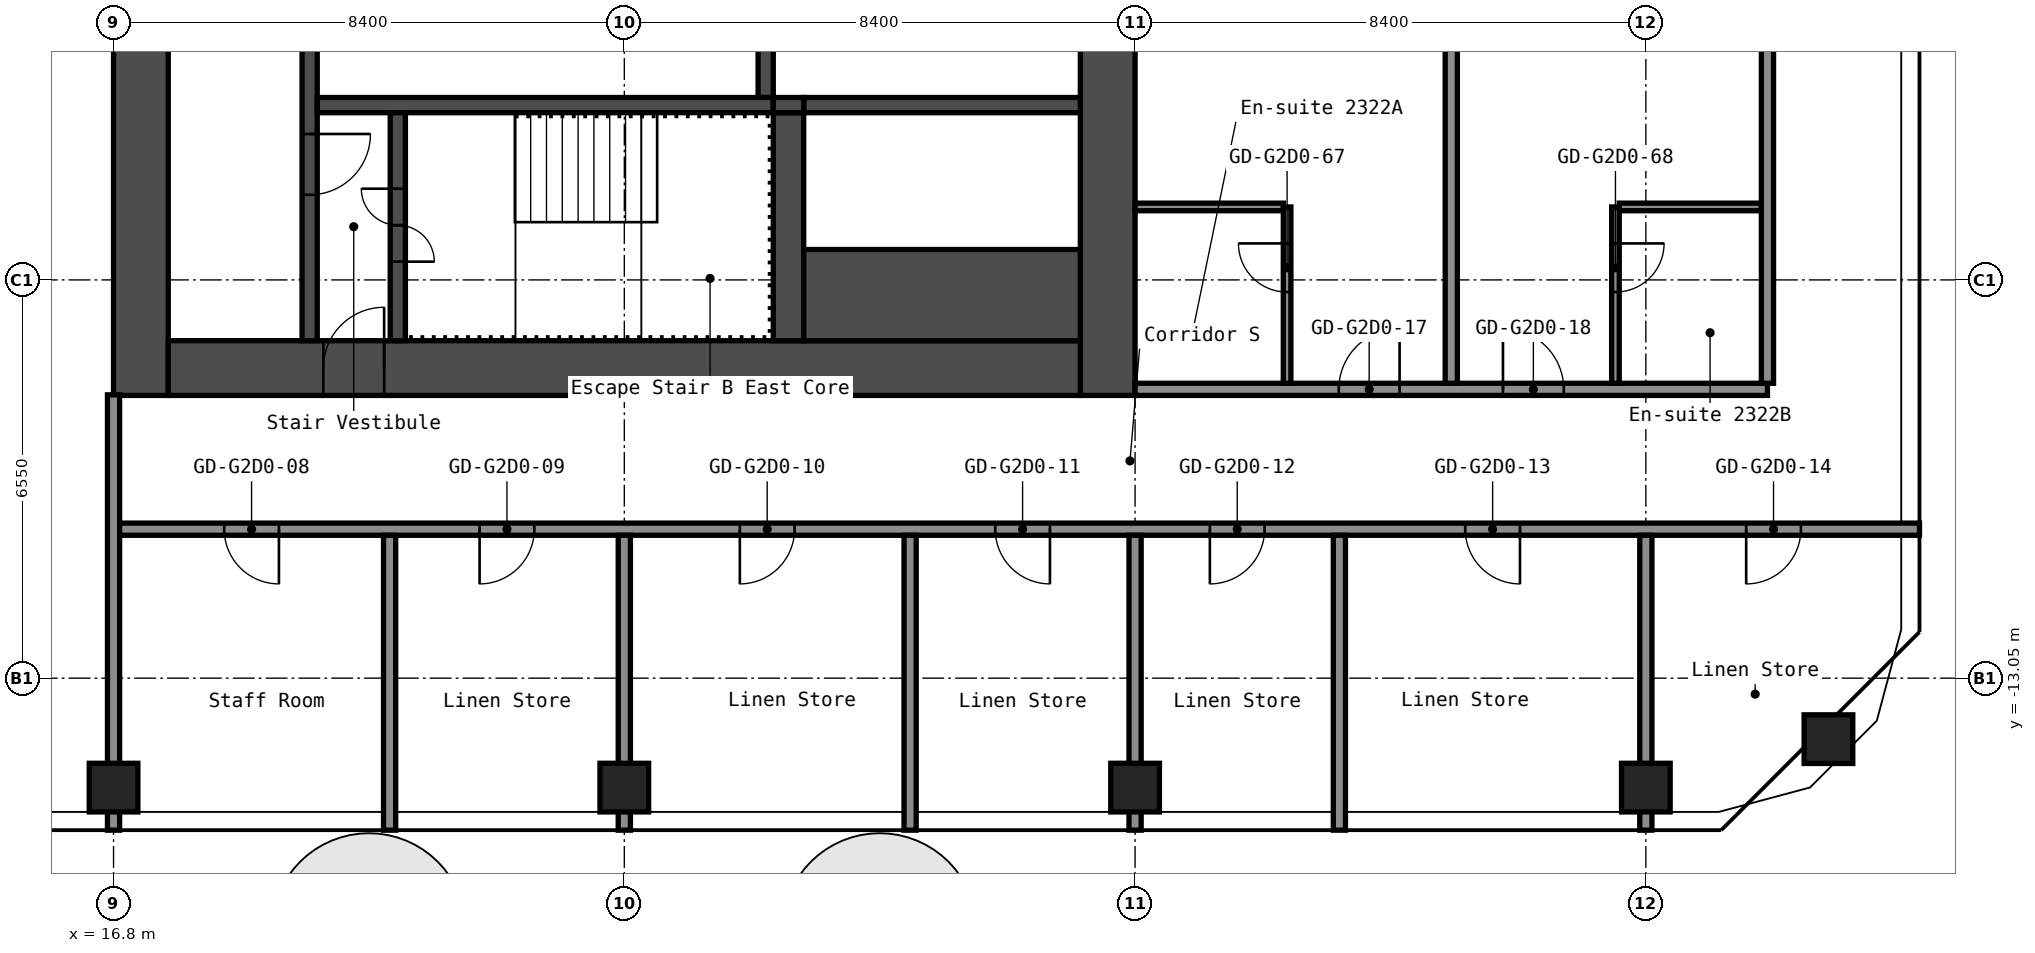
"""IFC4 building model, lengths in metres.
Left out: names, types, materials, properties, quantities, classifications, styles, units other than length and angle.
Written with IfcOpenShell. Run it as: python <this file> out.ifc"""

import sys

from ifc_helpers import new_model, si_unit, direction, frame, frame_2d, origin, origin_2d, place, context, subcontext, project, spatial, rectangle, hollow_rectangle, extrude, element, fill, save


model = new_model("IFC4")
c1 = context("Model", 3, precision=1e-05, world=origin(), true_north=direction((0.0, 1.0)))
c2 = subcontext(c1, "Body", "Model", "MODEL_VIEW")
j1 = project(units=[si_unit("LENGTHUNIT", "METRE"), si_unit("PLANEANGLEUNIT", "RADIAN")], contexts=[c1])
p1 = place(None, origin())
s1 = spatial("IfcSite", under=j1, at=p1, CompositionType="ELEMENT")
p2 = place(p1, origin())
s2 = spatial("IfcBuilding", under=s1, at=p2, CompositionType="ELEMENT")
p3 = place(p2, frame((0.0, 0.0, 85.0)))
s3 = spatial("IfcBuildingStorey", under=s2, at=p3, CompositionType="ELEMENT", Elevation=85.0)
for number, where, z_axis, x_axis in (
    (1, (16.8, -14.85, 0.0), (0.0, 0.0, 1.0), (1.0, 0.0, 0.0)),
    (2, (25.2, -14.85, 0.0), (0.0, 0.0, 1.0), (1.0, 0.0, 0.0)),
    (3, (33.6, -14.85, 0.0), (0.0, 0.0, 1.0), (1.0, 0.0, 0.0)),
    (4, (42.0, -14.85, 0.0), (0.0, 0.0, 1.0), (1.0, 0.0, 0.0)),
    (5, (45.003, -14.053, 0.0), (0.0, 0.0, 1.0), (1.0, 0.0, 0.0)),
):
    element("IfcColumn", number, at=place(p3, frame(where, z_axis=z_axis, x_axis=x_axis)), inside=s3, PredefinedType="COLUMN", context=c2, shape_type="SweptSolid", body=[
        extrude(hollow_rectangle(XDim=0.8, YDim=0.8, WallThickness=0.032, at=origin_2d()), origin(), (0.0, 0.0, 1.0), 2.8),
    ])
p4 = place(p3, frame((17.25, -8.4, 0.0), z_axis=(0.0, 0.0, 1.0), x_axis=(0.0, 1.0, 0.0)))
e6 = element("IfcWall", 6, at=p4, inside=s3, PredefinedType="SHEAR", context=c2, shape_type="SweptSolid", body=[
    extrude(rectangle(XDim=16.8, YDim=0.9, at=frame_2d((8.4, 0.0))), origin(), (0.0, 0.0, 1.0), 2.8),
])
p5 = place(p4, frame((7.6, 0.0, 0.0)))
e7 = element("IfcOpeningElement", 7, at=p5, cuts=e6, PredefinedType="OPENING", context=c2, shape_type="SweptSolid", body=[
    extrude(rectangle(XDim=1.2, YDim=2.1, at=frame_2d((0.6, 1.05))), frame((0.0, 0.46, 0.0), z_axis=(0.0, -1.0, 0.0), x_axis=(1.0, 0.0, 0.0)), (0.0, 0.0, 1.0), 0.92),
])
p6 = place(p3, frame((33.15, -8.4, 0.0), z_axis=(0.0, 0.0, 1.0), x_axis=(0.0, 1.0, 0.0)))
e8 = element("IfcWall", 8, at=p6, inside=s3, PredefinedType="SHEAR", context=c2, shape_type="SweptSolid", body=[
    extrude(rectangle(XDim=16.8, YDim=0.9, at=frame_2d((8.4, 0.0))), origin(), (0.0, 0.0, 1.0), 2.8),
])
p7 = place(p3, frame((17.7, -7.95, 0.0), z_axis=(0.0, 0.0, 1.0), x_axis=(1.0, 0.0, 0.0)))
e9 = element("IfcWall", 9, at=p7, inside=s3, PredefinedType="SHEAR", context=c2, shape_type="SweptSolid", body=[
    extrude(rectangle(XDim=15.0, YDim=0.9, at=frame_2d((7.5, 0.0))), origin(), (0.0, 0.0, 1.0), 2.8),
])
p8 = place(p7, frame((2.55, 0.0, 0.0)))
e10 = element("IfcOpeningElement", 10, at=p8, cuts=e9, PredefinedType="OPENING", context=c2, shape_type="SweptSolid", body=[
    extrude(rectangle(XDim=1.0, YDim=2.1, at=frame_2d((0.5, 1.05))), frame((0.0, 0.46, 0.0), z_axis=(0.0, -1.0, 0.0), x_axis=(1.0, 0.0, 0.0)), (0.0, 0.0, 1.0), 0.92),
])
p9 = place(p3, frame((20.025, -7.5, 0.0), z_axis=(0.0, 0.0, 1.0), x_axis=(0.0, 1.0, 0.0)))
e11 = element("IfcWall", 11, at=p9, inside=s3, PredefinedType="SHEAR", context=c2, shape_type="SweptSolid", body=[
    extrude(rectangle(XDim=6.3, YDim=0.25, at=frame_2d((3.15, 0.0))), origin(), (0.0, 0.0, 1.0), 2.8),
])
p10 = place(p9, frame((2.4, 0.0, 0.0)))
e12 = element("IfcOpeningElement", 12, at=p10, cuts=e11, PredefinedType="OPENING", context=c2, shape_type="SweptSolid", body=[
    extrude(rectangle(XDim=1.0, YDim=2.1, at=frame_2d((0.5, 1.05))), frame((0.0, 0.135, 0.0), z_axis=(0.0, -1.0, 0.0), x_axis=(1.0, 0.0, 0.0)), (0.0, 0.0, 1.0), 0.27),
])
p11 = place(p3, frame((27.525, -3.5, 0.0), z_axis=(0.0, 0.0, 1.0), x_axis=(0.0, 1.0, 0.0)))
e13 = element("IfcWall", 13, at=p11, inside=s3, PredefinedType="SHEAR", context=c2, shape_type="SweptSolid", body=[
    extrude(rectangle(XDim=2.05, YDim=0.25, at=frame_2d((1.025, 0.0))), origin(), (0.0, 0.0, 1.0), 2.8),
])
p12 = place(p3, frame((20.15, -3.625, 0.0), z_axis=(0.0, 0.0, 1.0), x_axis=(1.0, 0.0, 0.0)))
e14 = element("IfcWall", 14, at=p12, inside=s3, PredefinedType="SHEAR", context=c2, shape_type="SweptSolid", body=[
    extrude(rectangle(XDim=7.5, YDim=0.25, at=frame_2d((3.75, 0.0))), origin(), (0.0, 0.0, 1.0), 2.8),
])
p13 = place(p3, frame((21.475, -7.5, 0.0), z_axis=(0.0, 0.0, 1.0), x_axis=(0.0, 1.0, 0.0)))
e15 = element("IfcWall", 15, at=p13, inside=s3, PredefinedType="SHEAR", context=c2, shape_type="SweptSolid", body=[
    extrude(rectangle(XDim=3.75, YDim=0.25, at=frame_2d((1.875, 0.0))), origin(), (0.0, 0.0, 1.0), 2.8),
])
p14 = place(p13, frame((1.3, 0.0, 0.0)))
e16 = element("IfcOpeningElement", 16, at=p14, cuts=e15, PredefinedType="OPENING", context=c2, shape_type="SweptSolid", body=[
    extrude(rectangle(XDim=1.2, YDim=2.1, at=frame_2d((0.6, 1.05))), frame((0.0, 0.135, 0.0), z_axis=(0.0, -1.0, 0.0), x_axis=(1.0, 0.0, 0.0)), (0.0, 0.0, 1.0), 0.27),
])
p15 = place(p3, frame((27.9, -7.5, 0.0), z_axis=(0.0, 0.0, 1.0), x_axis=(0.0, 1.0, 0.0)))
e17 = element("IfcWall", 17, at=p15, inside=s3, PredefinedType="SHEAR", context=c2, shape_type="SweptSolid", body=[
    extrude(rectangle(XDim=3.75, YDim=0.5, at=frame_2d((1.875, 0.0))), origin(), (0.0, 0.0, 1.0), 2.8),
])
p16 = place(p3, frame((28.15, -3.625, 0.0), z_axis=(0.0, 0.0, 1.0), x_axis=(1.0, 0.0, 0.0)))
e18 = element("IfcWall", 18, at=p16, inside=s3, PredefinedType="SHEAR", context=c2, shape_type="SweptSolid", body=[
    extrude(rectangle(XDim=4.55, YDim=0.25, at=frame_2d((2.275, 0.0))), origin(), (0.0, 0.0, 1.0), 2.8),
])
p17 = place(p3, frame((28.15, -6.75, 0.0), z_axis=(0.0, 0.0, 1.0), x_axis=(1.0, 0.0, 0.0)))
e19 = element("IfcWall", 19, at=p17, inside=s3, PredefinedType="SHEAR", context=c2, shape_type="SweptSolid", body=[
    extrude(rectangle(XDim=4.55, YDim=1.5, at=frame_2d((2.275, 0.0))), origin(), (0.0, 0.0, 1.0), 2.8),
])
p18 = place(p3, frame((27.65, -3.625, 0.0), z_axis=(0.0, 0.0, 1.0), x_axis=(1.0, 0.0, 0.0)))
e20 = element("IfcWall", 20, at=p18, inside=s3, PredefinedType="SHEAR", context=c2, shape_type="SweptSolid", body=[
    extrude(rectangle(XDim=0.5, YDim=0.25, at=frame_2d((0.25, 0.0))), origin(), (0.0, 0.0, 1.0), 2.8),
])
p19 = place(p3, frame((16.8, -10.6, 0.0), z_axis=(0.0, 0.0, 1.0), x_axis=(1.0, 0.0, 0.0)))
e21 = element("IfcWall", 21, at=p19, inside=s3, PredefinedType="PARTITIONING", context=c2, shape_type="SweptSolid", body=[
    extrude(rectangle(XDim=29.7, YDim=0.2, at=frame_2d((14.85, 0.0))), origin(), (0.0, 0.0, 1.0), 2.8),
])
p20 = place(p19, frame((1.82, 0.0, 0.0)))
e22 = element("IfcOpeningElement", 22, at=p20, cuts=e21, PredefinedType="OPENING", context=c2, shape_type="SweptSolid", body=[
    extrude(rectangle(XDim=0.9, YDim=2.1, at=frame_2d((0.45, 1.05))), frame((0.0, 0.11, 0.0), z_axis=(0.0, -1.0, 0.0), x_axis=(1.0, 0.0, 0.0)), (0.0, 0.0, 1.0), 0.22),
])
p21 = place(p19, frame((6.02, 0.0, 0.0)))
e23 = element("IfcOpeningElement", 23, at=p21, cuts=e21, PredefinedType="OPENING", context=c2, shape_type="SweptSolid", body=[
    extrude(rectangle(XDim=0.9, YDim=2.1, at=frame_2d((0.45, 1.05))), frame((0.0, 0.11, 0.0), z_axis=(0.0, -1.0, 0.0), x_axis=(1.0, 0.0, 0.0)), (0.0, 0.0, 1.0), 0.22),
])
p22 = place(p19, frame((10.3, 0.0, 0.0)))
e24 = element("IfcOpeningElement", 24, at=p22, cuts=e21, PredefinedType="OPENING", context=c2, shape_type="SweptSolid", body=[
    extrude(rectangle(XDim=0.9, YDim=2.1, at=frame_2d((0.45, 1.05))), frame((0.0, 0.11, 0.0), z_axis=(0.0, -1.0, 0.0), x_axis=(1.0, 0.0, 0.0)), (0.0, 0.0, 1.0), 0.22),
])
p23 = place(p19, frame((14.5, 0.0, 0.0)))
e25 = element("IfcOpeningElement", 25, at=p23, cuts=e21, PredefinedType="OPENING", context=c2, shape_type="SweptSolid", body=[
    extrude(rectangle(XDim=0.9, YDim=2.1, at=frame_2d((0.45, 1.05))), frame((0.0, 0.11, 0.0), z_axis=(0.0, -1.0, 0.0), x_axis=(1.0, 0.0, 0.0)), (0.0, 0.0, 1.0), 0.22),
])
p24 = place(p19, frame((18.03, 0.0, 0.0)))
e26 = element("IfcOpeningElement", 26, at=p24, cuts=e21, PredefinedType="OPENING", context=c2, shape_type="SweptSolid", body=[
    extrude(rectangle(XDim=0.9, YDim=2.1, at=frame_2d((0.45, 1.05))), frame((0.0, 0.11, 0.0), z_axis=(0.0, -1.0, 0.0), x_axis=(1.0, 0.0, 0.0)), (0.0, 0.0, 1.0), 0.22),
])
p25 = place(p19, frame((22.23, 0.0, 0.0)))
e27 = element("IfcOpeningElement", 27, at=p25, cuts=e21, PredefinedType="OPENING", context=c2, shape_type="SweptSolid", body=[
    extrude(rectangle(XDim=0.9, YDim=2.1, at=frame_2d((0.45, 1.05))), frame((0.0, 0.11, 0.0), z_axis=(0.0, -1.0, 0.0), x_axis=(1.0, 0.0, 0.0)), (0.0, 0.0, 1.0), 0.22),
])
p26 = place(p19, frame((26.85, 0.0, 0.0)))
e28 = element("IfcOpeningElement", 28, at=p26, cuts=e21, PredefinedType="OPENING", context=c2, shape_type="SweptSolid", body=[
    extrude(rectangle(XDim=0.9, YDim=2.1, at=frame_2d((0.45, 1.05))), frame((0.0, 0.11, 0.0), z_axis=(0.0, -1.0, 0.0), x_axis=(1.0, 0.0, 0.0)), (0.0, 0.0, 1.0), 0.22),
])
p27 = place(p3, frame((33.6, -8.3, 0.0), z_axis=(0.0, 0.0, 1.0), x_axis=(1.0, 0.0, 0.0)))
e29 = element("IfcWall", 29, at=p27, inside=s3, PredefinedType="PARTITIONING", context=c2, shape_type="SweptSolid", body=[
    extrude(rectangle(XDim=10.4, YDim=0.2, at=frame_2d((5.2, 0.0))), origin(), (0.0, 0.0, 1.0), 2.8),
])
p28 = place(p27, frame((3.35, 0.0, 0.0)))
e30 = element("IfcOpeningElement", 30, at=p28, cuts=e29, PredefinedType="OPENING", context=c2, shape_type="SweptSolid", body=[
    extrude(rectangle(XDim=1.0, YDim=2.1, at=frame_2d((0.5, 1.05))), frame((0.0, 0.11, 0.0), z_axis=(0.0, -1.0, 0.0), x_axis=(1.0, 0.0, 0.0)), (0.0, 0.0, 1.0), 0.22),
])
p29 = place(p27, frame((6.05, 0.0, 0.0)))
e31 = element("IfcOpeningElement", 31, at=p29, cuts=e29, PredefinedType="OPENING", context=c2, shape_type="SweptSolid", body=[
    extrude(rectangle(XDim=1.0, YDim=2.1, at=frame_2d((0.5, 1.05))), frame((0.0, 0.11, 0.0), z_axis=(0.0, -1.0, 0.0), x_axis=(1.0, 0.0, 0.0)), (0.0, 0.0, 1.0), 0.22),
])
p30 = place(p3, frame((33.6, -5.3, 0.0), z_axis=(0.0, 0.0, 1.0), x_axis=(1.0, 0.0, 0.0)))
e32 = element("IfcWall", 32, at=p30, inside=s3, PredefinedType="PARTITIONING", context=c2, shape_type="SweptSolid", body=[
    extrude(rectangle(XDim=2.438, YDim=0.125, at=frame_2d((1.219, 0.0))), origin(), (0.0, 0.0, 1.0), 2.8),
])
p31 = place(p3, frame((41.562, -5.3, 0.0), z_axis=(0.0, 0.0, 1.0), x_axis=(1.0, 0.0, 0.0)))
e33 = element("IfcWall", 33, at=p31, inside=s3, PredefinedType="PARTITIONING", context=c2, shape_type="SweptSolid", body=[
    extrude(rectangle(XDim=2.337, YDim=0.125, at=frame_2d((1.169, 0.0))), origin(), (0.0, 0.0, 1.0), 2.8),
])
p32 = place(p3, frame((16.8, -15.55, 0.0), z_axis=(0.0, 0.0, 1.0), x_axis=(0.0, 1.0, 0.0)))
e34 = element("IfcWall", 34, at=p32, inside=s3, PredefinedType="PARTITIONING", context=c2, shape_type="SweptSolid", body=[
    extrude(rectangle(XDim=7.16, YDim=0.2, at=frame_2d((3.58, 0.0))), origin(), (0.0, 0.0, 1.0), 2.8),
])
for number, where, z_axis, x_axis in (
    (35, (21.34, -15.55, 0.0), (0.0, 0.0, 1.0), (0.0, 1.0, 0.0)),
    (36, (25.2, -15.55, 0.0), (0.0, 0.0, 1.0), (0.0, 1.0, 0.0)),
    (37, (29.9, -15.55, 0.0), (0.0, 0.0, 1.0), (0.0, 1.0, 0.0)),
    (38, (33.6, -15.55, 0.0), (0.0, 0.0, 1.0), (0.0, 1.0, 0.0)),
):
    element("IfcWall", number, at=place(p3, frame(where, z_axis=z_axis, x_axis=x_axis)), inside=s3, PredefinedType="PARTITIONING", context=c2, shape_type="SweptSolid", body=[
        extrude(rectangle(XDim=4.85, YDim=0.2, at=frame_2d((2.425, 0.0))), origin(), (0.0, 0.0, 1.0), 2.8),
    ])
p33 = place(p3, frame((36.1, -8.2, 0.0), z_axis=(0.0, 0.0, 1.0), x_axis=(0.0, 1.0, 0.0)))
e39 = element("IfcWall", 39, at=p33, inside=s3, PredefinedType="PARTITIONING", context=c2, shape_type="SweptSolid", body=[
    extrude(rectangle(XDim=2.9, YDim=0.125, at=frame_2d((1.45, 0.0))), origin(), (0.0, 0.0, 1.0), 2.8),
])
p34 = place(p33, frame((1.5, 0.0, 0.0)))
e40 = element("IfcOpeningElement", 40, at=p34, cuts=e39, PredefinedType="OPENING", context=c2, shape_type="SweptSolid", body=[
    extrude(rectangle(XDim=0.8, YDim=2.1, at=frame_2d((0.4, 1.05))), frame((0.0, 0.073, 0.0), z_axis=(0.0, -1.0, 0.0), x_axis=(1.0, 0.0, 0.0)), (0.0, 0.0, 1.0), 0.145),
])
p35 = place(p3, frame((36.96, -15.55, 0.0), z_axis=(0.0, 0.0, 1.0), x_axis=(0.0, 1.0, 0.0)))
e41 = element("IfcWall", 41, at=p35, inside=s3, PredefinedType="PARTITIONING", context=c2, shape_type="SweptSolid", body=[
    extrude(rectangle(XDim=4.85, YDim=0.2, at=frame_2d((2.425, 0.0))), origin(), (0.0, 0.0, 1.0), 2.8),
])
p36 = place(p3, frame((38.8, -8.2, 0.0), z_axis=(0.0, 0.0, 1.0), x_axis=(0.0, 1.0, 0.0)))
e42 = element("IfcWall", 42, at=p36, inside=s3, PredefinedType="PARTITIONING", context=c2, shape_type="SweptSolid", body=[
    extrude(rectangle(XDim=8.2, YDim=0.2, at=frame_2d((4.1, 0.0))), origin(), (0.0, 0.0, 1.0), 2.8),
])
p37 = place(p3, frame((41.5, -8.2, 0.0), z_axis=(0.0, 0.0, 1.0), x_axis=(0.0, 1.0, 0.0)))
e43 = element("IfcWall", 43, at=p37, inside=s3, PredefinedType="PARTITIONING", context=c2, shape_type="SweptSolid", body=[
    extrude(rectangle(XDim=2.9, YDim=0.125, at=frame_2d((1.45, 0.0))), origin(), (0.0, 0.0, 1.0), 2.8),
])
p38 = place(p37, frame((1.5, 0.0, 0.0)))
e44 = element("IfcOpeningElement", 44, at=p38, cuts=e43, PredefinedType="OPENING", context=c2, shape_type="SweptSolid", body=[
    extrude(rectangle(XDim=0.8, YDim=2.1, at=frame_2d((0.4, 1.05))), frame((0.0, 0.073, 0.0), z_axis=(0.0, -1.0, 0.0), x_axis=(1.0, 0.0, 0.0)), (0.0, 0.0, 1.0), 0.145),
])
p39 = place(p3, frame((42.0, -15.55, 0.0), z_axis=(0.0, 0.0, 1.0), x_axis=(0.0, 1.0, 0.0)))
e45 = element("IfcWall", 45, at=p39, inside=s3, PredefinedType="PARTITIONING", context=c2, shape_type="SweptSolid", body=[
    extrude(rectangle(XDim=4.85, YDim=0.2, at=frame_2d((2.425, 0.0))), origin(), (0.0, 0.0, 1.0), 2.8),
])
p40 = place(p3, frame((44.0, -8.2, 0.0), z_axis=(0.0, 0.0, 1.0), x_axis=(0.0, 1.0, 0.0)))
e46 = element("IfcWall", 46, at=p40, inside=s3, PredefinedType="PARTITIONING", context=c2, shape_type="SweptSolid", body=[
    extrude(rectangle(XDim=16.4, YDim=0.2, at=frame_2d((8.2, 0.0))), origin(), (0.0, 0.0, 1.0), 2.8),
])
p41 = place(p8, origin())
e47 = element("IfcDoor", 47, at=p41, inside=s3, OperationType="SINGLE_SWING_LEFT", PredefinedType="DOOR", context=c2, shape_type="SweptSolid", body=[
    extrude(rectangle(XDim=1.0, YDim=2.1, at=frame_2d((0.5, 1.05))), frame((0.0, 0.025, 0.0), z_axis=(0.0, -1.0, 0.0), x_axis=(1.0, 0.0, 0.0)), (0.0, 0.0, 1.0), 0.05),
])
fill(e10, e47)
p42 = place(p14, origin())
e48 = element("IfcDoor", 48, at=p42, inside=s3, OperationType="DOUBLE_DOOR_SINGLE_SWING", PredefinedType="DOOR", context=c2, shape_type="SweptSolid", body=[
    extrude(rectangle(XDim=1.2, YDim=2.1, at=frame_2d((0.6, 1.05))), frame((0.0, 0.025, 0.0), z_axis=(0.0, -1.0, 0.0), x_axis=(1.0, 0.0, 0.0)), (0.0, 0.0, 1.0), 0.05),
])
fill(e16, e48)
p43 = place(p10, origin())
e49 = element("IfcDoor", 49, at=p43, inside=s3, OperationType="SINGLE_SWING_RIGHT", PredefinedType="DOOR", context=c2, shape_type="SweptSolid", body=[
    extrude(rectangle(XDim=1.0, YDim=2.1, at=frame_2d((0.5, 1.05))), frame((0.0, 0.025, 0.0), z_axis=(0.0, -1.0, 0.0), x_axis=(1.0, 0.0, 0.0)), (0.0, 0.0, 1.0), 0.05),
])
fill(e12, e49)
p44 = place(p20, origin())
e50 = element("IfcDoor", 50, at=p44, inside=s3, OperationType="SINGLE_SWING_RIGHT", PredefinedType="DOOR", context=c2, shape_type="SweptSolid", body=[
    extrude(rectangle(XDim=0.9, YDim=2.1, at=frame_2d((0.45, 1.05))), frame((0.0, 0.025, 0.0), z_axis=(0.0, -1.0, 0.0), x_axis=(1.0, 0.0, 0.0)), (0.0, 0.0, 1.0), 0.05),
])
fill(e22, e50)
p45 = place(p21, origin())
e51 = element("IfcDoor", 51, at=p45, inside=s3, OperationType="SINGLE_SWING_LEFT", PredefinedType="DOOR", context=c2, shape_type="SweptSolid", body=[
    extrude(rectangle(XDim=0.9, YDim=2.1, at=frame_2d((0.45, 1.05))), frame((0.0, 0.025, 0.0), z_axis=(0.0, -1.0, 0.0), x_axis=(1.0, 0.0, 0.0)), (0.0, 0.0, 1.0), 0.05),
])
fill(e23, e51)
p46 = place(p22, origin())
e52 = element("IfcDoor", 52, at=p46, inside=s3, OperationType="SINGLE_SWING_LEFT", PredefinedType="DOOR", context=c2, shape_type="SweptSolid", body=[
    extrude(rectangle(XDim=0.9, YDim=2.1, at=frame_2d((0.45, 1.05))), frame((0.0, 0.025, 0.0), z_axis=(0.0, -1.0, 0.0), x_axis=(1.0, 0.0, 0.0)), (0.0, 0.0, 1.0), 0.05),
])
fill(e24, e52)
p47 = place(p23, origin())
e53 = element("IfcDoor", 53, at=p47, inside=s3, OperationType="SINGLE_SWING_RIGHT", PredefinedType="DOOR", context=c2, shape_type="SweptSolid", body=[
    extrude(rectangle(XDim=0.9, YDim=2.1, at=frame_2d((0.45, 1.05))), frame((0.0, 0.025, 0.0), z_axis=(0.0, -1.0, 0.0), x_axis=(1.0, 0.0, 0.0)), (0.0, 0.0, 1.0), 0.05),
])
fill(e25, e53)
p48 = place(p24, origin())
e54 = element("IfcDoor", 54, at=p48, inside=s3, OperationType="SINGLE_SWING_LEFT", PredefinedType="DOOR", context=c2, shape_type="SweptSolid", body=[
    extrude(rectangle(XDim=0.9, YDim=2.1, at=frame_2d((0.45, 1.05))), frame((0.0, 0.025, 0.0), z_axis=(0.0, -1.0, 0.0), x_axis=(1.0, 0.0, 0.0)), (0.0, 0.0, 1.0), 0.05),
])
fill(e26, e54)
p49 = place(p25, origin())
e55 = element("IfcDoor", 55, at=p49, inside=s3, OperationType="SINGLE_SWING_RIGHT", PredefinedType="DOOR", context=c2, shape_type="SweptSolid", body=[
    extrude(rectangle(XDim=0.9, YDim=2.1, at=frame_2d((0.45, 1.05))), frame((0.0, 0.025, 0.0), z_axis=(0.0, -1.0, 0.0), x_axis=(1.0, 0.0, 0.0)), (0.0, 0.0, 1.0), 0.05),
])
fill(e27, e55)
p50 = place(p26, origin())
e56 = element("IfcDoor", 56, at=p50, inside=s3, OperationType="SINGLE_SWING_LEFT", PredefinedType="DOOR", context=c2, shape_type="SweptSolid", body=[
    extrude(rectangle(XDim=0.9, YDim=2.1, at=frame_2d((0.45, 1.05))), frame((0.0, 0.025, 0.0), z_axis=(0.0, -1.0, 0.0), x_axis=(1.0, 0.0, 0.0)), (0.0, 0.0, 1.0), 0.05),
])
fill(e28, e56)
p51 = place(p28, origin())
e57 = element("IfcDoor", 57, at=p51, inside=s3, OperationType="SINGLE_SWING_LEFT", PredefinedType="DOOR", context=c2, shape_type="SweptSolid", body=[
    extrude(rectangle(XDim=1.0, YDim=2.1, at=frame_2d((0.5, 1.05))), frame((0.0, 0.025, 0.0), z_axis=(0.0, -1.0, 0.0), x_axis=(1.0, 0.0, 0.0)), (0.0, 0.0, 1.0), 0.05),
])
fill(e30, e57)
p52 = place(p29, origin())
e58 = element("IfcDoor", 58, at=p52, inside=s3, OperationType="SINGLE_SWING_RIGHT", PredefinedType="DOOR", context=c2, shape_type="SweptSolid", body=[
    extrude(rectangle(XDim=1.0, YDim=2.1, at=frame_2d((0.5, 1.05))), frame((0.0, 0.025, 0.0), z_axis=(0.0, -1.0, 0.0), x_axis=(1.0, 0.0, 0.0)), (0.0, 0.0, 1.0), 0.05),
])
fill(e31, e58)
p53 = place(p34, origin())
e59 = element("IfcDoor", 59, at=p53, inside=s3, OperationType="SINGLE_SWING_LEFT", PredefinedType="DOOR", context=c2, shape_type="SweptSolid", body=[
    extrude(rectangle(XDim=0.8, YDim=2.1, at=frame_2d((0.4, 1.05))), frame((0.0, 0.025, 0.0), z_axis=(0.0, -1.0, 0.0), x_axis=(1.0, 0.0, 0.0)), (0.0, 0.0, 1.0), 0.05),
])
fill(e40, e59)
p54 = place(p38, origin())
e60 = element("IfcDoor", 60, at=p54, inside=s3, OperationType="SINGLE_SWING_RIGHT", PredefinedType="DOOR", context=c2, shape_type="SweptSolid", body=[
    extrude(rectangle(XDim=0.8, YDim=2.1, at=frame_2d((0.4, 1.05))), frame((0.0, 0.025, 0.0), z_axis=(0.0, -1.0, 0.0), x_axis=(1.0, 0.0, 0.0)), (0.0, 0.0, 1.0), 0.05),
])
fill(e44, e60)
save(model, sys.argv[1])
